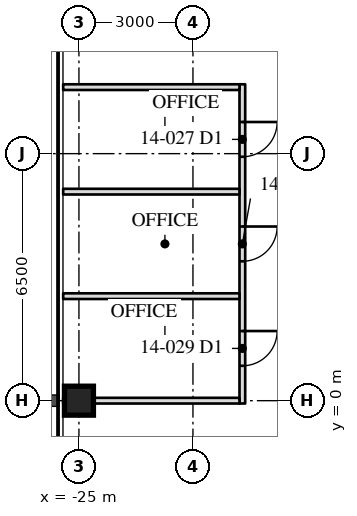
"""IFC4 building model, lengths in metres.
Left out: names, types, materials, properties, quantities, classifications, styles, units other than length and angle.
Written with IfcOpenShell. Run it as: python <this file> out.ifc"""

import sys

from ifc_helpers import new_model, si_unit, direction, frame, frame_2d, origin, origin_2d, place, context, subcontext, project, spatial, rectangle, hollow_rectangle, extrude, element, fill, save


model = new_model("IFC4")
c1 = context("Model", 3, precision=1e-05, world=origin(), true_north=direction((0.0, 1.0)))
c2 = subcontext(c1, "Body", "Model", "MODEL_VIEW")
j1 = project(units=[si_unit("LENGTHUNIT", "METRE"), si_unit("PLANEANGLEUNIT", "RADIAN")], contexts=[c1])
p1 = place(None, origin())
s1 = spatial("IfcSite", under=j1, at=p1, CompositionType="ELEMENT")
p2 = place(p1, origin())
s2 = spatial("IfcBuilding", under=s1, at=p2, CompositionType="ELEMENT")
p3 = place(p2, frame((0.0, 0.0, 61.1)))
s3 = spatial("IfcBuildingStorey", under=s2, at=p3, CompositionType="ELEMENT", Elevation=61.1)
p4 = place(p3, frame((-25.0, 0.0, 0.0), z_axis=(0.0, 0.0, 1.0), x_axis=(0.0, 1.0, 0.0)))
e1 = element("IfcColumn", 1, at=p4, inside=s3, PredefinedType="COLUMN", context=c2, shape_type="SweptSolid", body=[
    extrude(hollow_rectangle(XDim=0.762, YDim=0.762, WallThickness=0.127, at=origin_2d()), origin(), (0.0, 0.0, 1.0), 4.1),
])
p5 = place(p3, frame((-20.7, 8.325, 0.0), z_axis=(0.0, 0.0, 1.0), x_axis=(0.0, -1.0, 0.0)))
e2 = element("IfcWall", 2, at=p5, inside=s3, PredefinedType="PARTITIONING", context=c2, shape_type="SweptSolid", body=[
    extrude(rectangle(XDim=8.4, YDim=0.15, at=frame_2d((4.2, 0.0))), origin(), (0.0, 0.0, 1.0), 3.91),
])
p6 = place(p5, frame((0.992, 0.0, 0.0)))
e3 = element("IfcOpeningElement", 3, at=p6, cuts=e2, PredefinedType="OPENING", context=c2, shape_type="SweptSolid", body=[
    extrude(rectangle(XDim=0.915, YDim=2.134, at=frame_2d((0.458, 1.067))), frame((0.0, 0.085, 0.0), z_axis=(0.0, -1.0, 0.0), x_axis=(1.0, 0.0, 0.0)), (0.0, 0.0, 1.0), 0.17),
])
p7 = place(p5, frame((3.742, 0.0, 0.0)))
e4 = element("IfcOpeningElement", 4, at=p7, cuts=e2, PredefinedType="OPENING", context=c2, shape_type="SweptSolid", body=[
    extrude(rectangle(XDim=0.915, YDim=2.134, at=frame_2d((0.458, 1.067))), frame((0.0, 0.085, 0.0), z_axis=(0.0, -1.0, 0.0), x_axis=(1.0, 0.0, 0.0)), (0.0, 0.0, 1.0), 0.17),
])
p8 = place(p5, frame((6.492, 0.0, 0.0)))
e5 = element("IfcOpeningElement", 5, at=p8, cuts=e2, PredefinedType="OPENING", context=c2, shape_type="SweptSolid", body=[
    extrude(rectangle(XDim=0.915, YDim=2.134, at=frame_2d((0.458, 1.067))), frame((0.0, 0.085, 0.0), z_axis=(0.0, -1.0, 0.0), x_axis=(1.0, 0.0, 0.0)), (0.0, 0.0, 1.0), 0.17),
])
for number, where, z_axis, x_axis in (
    (6, (-20.775, 8.25, 0.0), (0.0, 0.0, 1.0), (-1.0, 0.0, 0.0)),
    (7, (-20.775, 5.5, 0.0), (0.0, 0.0, 1.0), (-1.0, 0.0, 0.0)),
    (8, (-20.775, 2.75, 0.0), (0.0, 0.0, 1.0), (-1.0, 0.0, 0.0)),
):
    element("IfcWall", number, at=place(p3, frame(where, z_axis=z_axis, x_axis=x_axis)), inside=s3, PredefinedType="PARTITIONING", context=c2, shape_type="SweptSolid", body=[
        extrude(rectangle(XDim=4.64, YDim=0.15, at=frame_2d((2.32, 0.0))), origin(), (0.0, 0.0, 1.0), 3.91),
    ])
p9 = place(p3, frame((-20.775, 0.0, 0.0), z_axis=(0.0, 0.0, 1.0), x_axis=(-1.0, 0.0, 0.0)))
e9 = element("IfcWall", 9, at=p9, inside=s3, PredefinedType="PARTITIONING", context=c2, shape_type="SweptSolid", body=[
    extrude(rectangle(XDim=4.64, YDim=0.15, at=frame_2d((2.32, 0.0))), origin(), (0.0, 0.0, 1.0), 3.13),
])
p10 = place(p6, origin())
e10 = element("IfcDoor", 10, at=p10, inside=s3, OperationType="SINGLE_SWING_LEFT", PredefinedType="DOOR", context=c2, shape_type="SweptSolid", body=[
    extrude(rectangle(XDim=0.915, YDim=2.134, at=frame_2d((0.458, 1.067))), frame((0.0, 0.025, 0.0), z_axis=(0.0, -1.0, 0.0), x_axis=(1.0, 0.0, 0.0)), (0.0, 0.0, 1.0), 0.05),
])
fill(e3, e10)
p11 = place(p7, origin())
e11 = element("IfcDoor", 11, at=p11, inside=s3, OperationType="SINGLE_SWING_LEFT", PredefinedType="DOOR", context=c2, shape_type="SweptSolid", body=[
    extrude(rectangle(XDim=0.915, YDim=2.134, at=frame_2d((0.458, 1.067))), frame((0.0, 0.025, 0.0), z_axis=(0.0, -1.0, 0.0), x_axis=(1.0, 0.0, 0.0)), (0.0, 0.0, 1.0), 0.05),
])
fill(e4, e11)
p12 = place(p8, origin())
e12 = element("IfcDoor", 12, at=p12, inside=s3, OperationType="SINGLE_SWING_LEFT", PredefinedType="DOOR", context=c2, shape_type="SweptSolid", body=[
    extrude(rectangle(XDim=0.915, YDim=2.134, at=frame_2d((0.458, 1.067))), frame((0.0, 0.025, 0.0), z_axis=(0.0, -1.0, 0.0), x_axis=(1.0, 0.0, 0.0)), (0.0, 0.0, 1.0), 0.05),
])
fill(e5, e12)
save(model, sys.argv[1])
